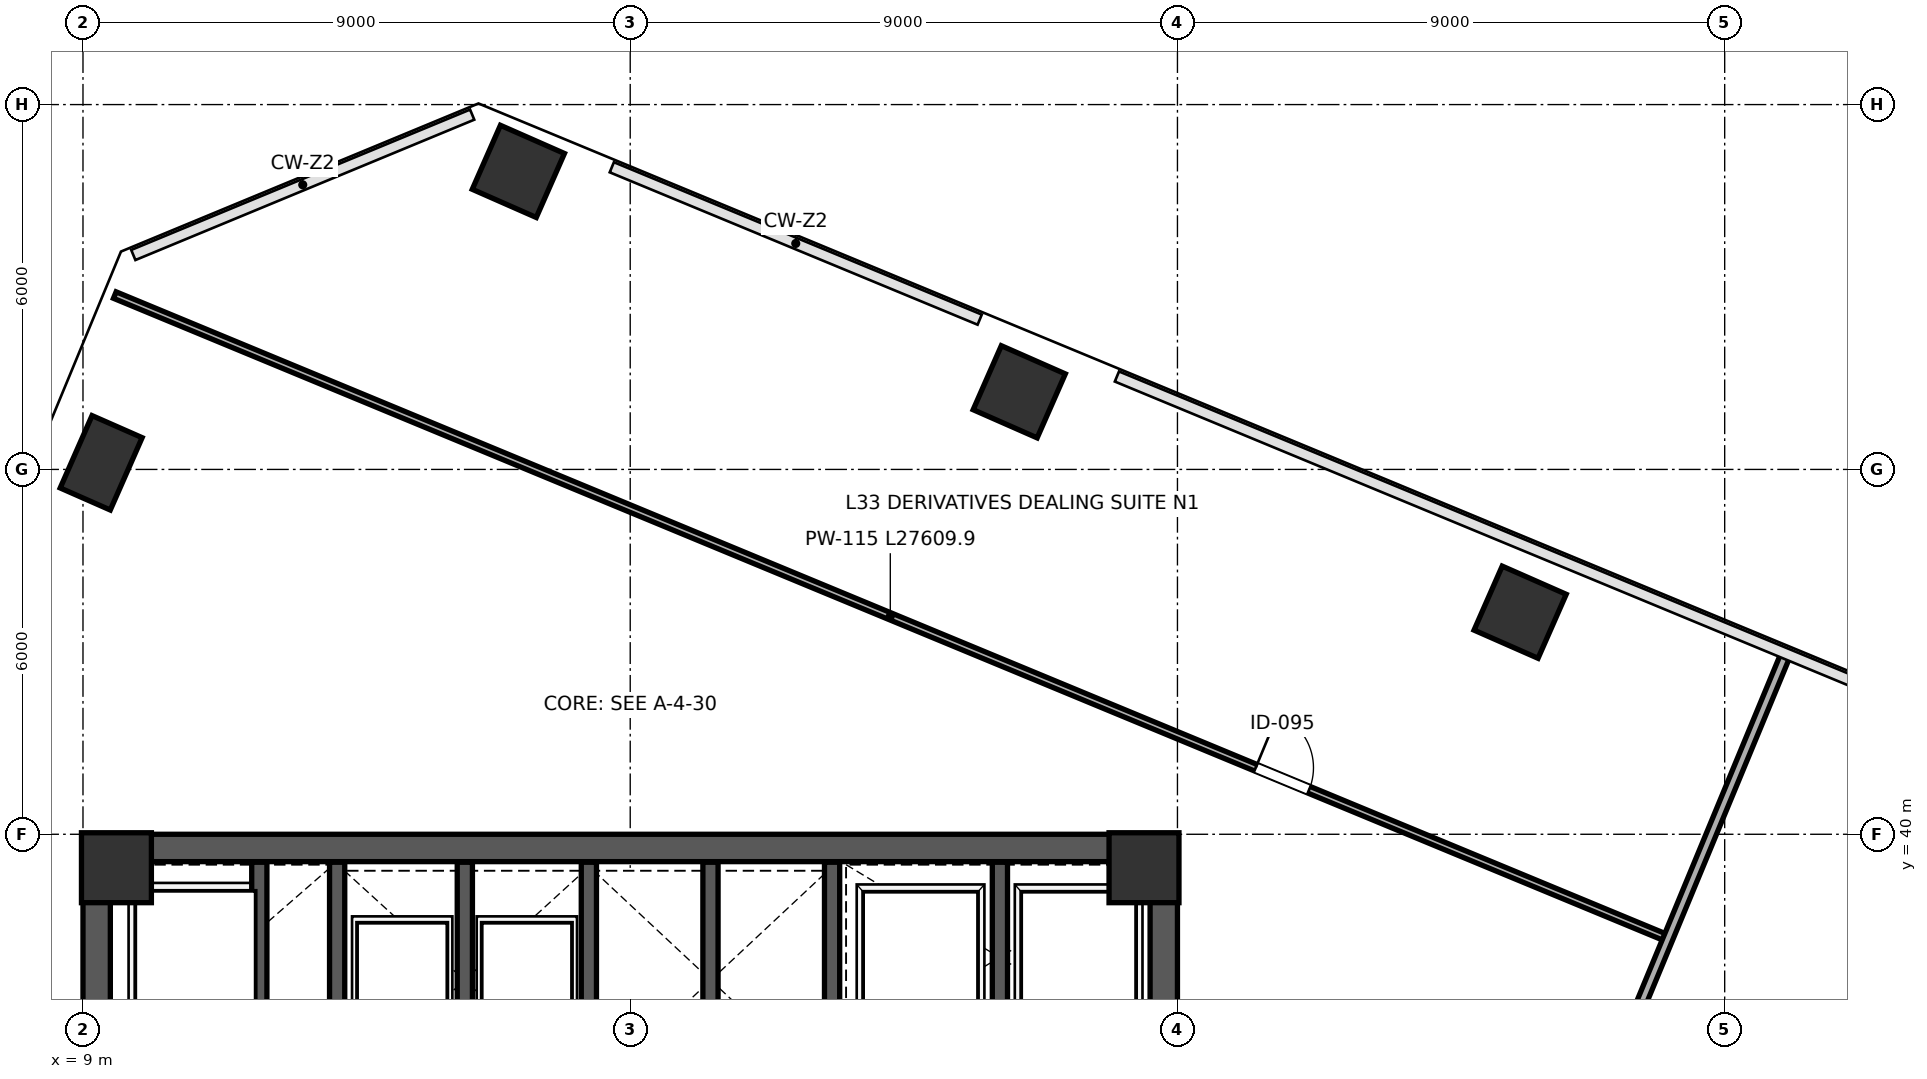
"""IFC4 building model, lengths in metres.
Left out: names, types, materials, properties, quantities, classifications, styles, units other than length and angle.
Written with IfcOpenShell. Run it as: python <this file> out.ifc"""

import sys

from ifc_helpers import new_model, si_unit, direction, frame, frame_2d, origin, origin_2d, place, context, subcontext, project, spatial, rectangle, extrude, clip, halfspace, source, transform, mapped, element, fill, save


model = new_model("IFC4")
c1 = context("Model", 3, precision=1e-05, world=origin(), true_north=direction((0.0, 1.0)))
c2 = subcontext(c1, "Body", "Model", "MODEL_VIEW")
j1 = project(units=[si_unit("LENGTHUNIT", "METRE"), si_unit("PLANEANGLEUNIT", "RADIAN")], contexts=[c1])
p1 = place(None, origin())
s1 = spatial("IfcSite", under=j1, at=p1, CompositionType="ELEMENT")
p2 = place(p1, origin())
s2 = spatial("IfcBuilding", under=s1, at=p2, CompositionType="ELEMENT")
p3 = place(p2, frame((0.0, 0.0, 149.8)))
s3 = spatial("IfcBuildingStorey", under=s2, at=p3, CompositionType="ELEMENT", Elevation=149.8)
m1 = source(origin(), c2, "Body", "SweptSolid", [
    extrude(rectangle(XDim=1.15, YDim=1.15, at=origin_2d()), origin(), (0.0, 0.0, 1.0), 4.198),
])
for number, where, z_axis, x_axis in (
    (1, (9.55, 39.45, 0.001), (0.0, 0.0, 1.0), (1.0, 0.0, 0.0)),
    (2, (26.45, 39.45, 0.001), (0.0, 0.0, 1.0), (1.0, 0.0, 0.0)),
):
    element("IfcColumn", number, at=place(p3, frame(where, z_axis=z_axis, x_axis=x_axis)), inside=s3, PredefinedType="COLUMN", context=c2, shape_type="MappedRepresentation", body=[
        mapped(m1, transform((0.0, 0.0, 0.0), scale=1.0)),
    ])
p4 = place(p3, frame((16.16, 50.901, 0.0), z_axis=(0.097962845796, 0.026485822535, 0.99483756566), x_axis=(-0.147888594985, -0.988159168403, 0.04087078876)))
e3 = element("IfcColumn", 3, at=p4, inside=s3, PredefinedType="COLUMN", context=c2, shape_type="Clipping", body=[
    clip(clip(extrude(rectangle(XDim=1.15, YDim=1.15, at=origin_2d()), origin(), (0.0, 0.0, 1.0), 4.222), halfspace(frame((0.0, 0.0, 0.078), z_axis=(0.0, 0.0, -1.0), x_axis=(1.0, 0.0, 0.0)), False)), halfspace(frame((0.0, 0.0, 4.144), z_axis=(0.0, 0.0, 1.0), x_axis=(1.0, 0.0, 0.0)), False)),
])
p5 = place(p3, frame((24.398, 47.277, 0.0), z_axis=(0.078972895195, -0.015875695732, 0.996750341916), x_axis=(-0.573957846388, -0.818241946245, 0.032442379315)))
e4 = element("IfcColumn", 4, at=p5, inside=s3, PredefinedType="COLUMN", context=c2, shape_type="Clipping", body=[
    clip(clip(extrude(rectangle(XDim=1.15, YDim=1.15, at=origin_2d()), origin(), (0.0, 0.0, 1.0), 4.214), halfspace(frame((0.0, 0.0, 0.062), z_axis=(0.0, 0.0, -1.0), x_axis=(1.0, 0.0, 0.0)), False)), halfspace(frame((0.0, 0.0, 4.152), z_axis=(0.0, 0.0, 1.0), x_axis=(1.0, 0.0, 0.0)), False)),
])
p6 = place(p3, frame((32.636, 43.652, 0.0), z_axis=(0.059722402109, -0.058274235229, 0.996512593094), x_axis=(-0.926484561929, -0.374829268194, 0.033606193079)))
e5 = element("IfcColumn", 5, at=p6, inside=s3, PredefinedType="COLUMN", context=c2, shape_type="Clipping", body=[
    clip(clip(extrude(rectangle(XDim=1.15, YDim=1.15, at=origin_2d()), origin(), (0.0, 0.0, 1.0), 4.215), halfspace(frame((0.0, 0.0, 0.064), z_axis=(0.0, 0.0, -1.0), x_axis=(1.0, 0.0, 0.0)), False)), halfspace(frame((0.0, 0.0, 4.15), z_axis=(0.0, 0.0, 1.0), x_axis=(1.0, 0.0, 0.0)), False)),
])
p7 = place(p3, frame((9.299, 46.109, 0.0), z_axis=(0.073596254147, 0.062255950835, 0.995343050391), x_axis=(0.285083814289, -0.957716020823, 0.038823218429)))
e6 = element("IfcColumn", 6, at=p7, inside=s3, PredefinedType="PILASTER", context=c2, shape_type="Clipping", body=[
    clip(clip(extrude(rectangle(XDim=0.9, YDim=1.3, at=origin_2d()), origin(), (0.0, 0.0, 1.0), 4.219), halfspace(frame((0.0, 0.0, 0.076), z_axis=(0.0, 0.0, -1.0), x_axis=(1.0, 0.0, 0.0)), False)), halfspace(frame((0.0, 0.0, 4.144), z_axis=(0.0, 0.0, 1.0), x_axis=(1.0, 0.0, 0.0)), False)),
])
p8 = place(p3, frame((9.225, 24.45, 0.0), z_axis=(0.0, 0.0, 1.0), x_axis=(0.0, 1.0, 0.0)))
e7 = element("IfcWall", 7, at=p8, inside=s3, PredefinedType="SHEAR", context=c2, shape_type="SweptSolid", body=[
    extrude(rectangle(XDim=15.1, YDim=0.45, at=frame_2d((7.55, 0.0))), origin(), (0.0, 0.0, 1.0), 3.96),
])
p9 = place(p3, frame((26.775, 24.45, 0.0), z_axis=(0.0, 0.0, 1.0), x_axis=(0.0, 1.0, 0.0)))
e8 = element("IfcWall", 8, at=p9, inside=s3, PredefinedType="SHEAR", context=c2, shape_type="SweptSolid", body=[
    extrude(rectangle(XDim=15.1, YDim=0.45, at=frame_2d((7.55, 0.0))), origin(), (0.0, 0.0, 1.0), 3.96),
])
p10 = place(p9, frame((8.6, 0.0, 0.0)))
e9 = element("IfcOpeningElement", 9, at=p10, cuts=e8, PredefinedType="OPENING", context=c2, shape_type="SweptSolid", body=[
    extrude(rectangle(XDim=1.15, YDim=2.2, at=frame_2d((0.575, 1.1))), frame((0.0, 0.235, 0.0), z_axis=(0.0, -1.0, 0.0), x_axis=(1.0, 0.0, 0.0)), (0.0, 0.0, 1.0), 0.47),
])
p11 = place(p3, frame((9.0, 39.775, 0.0), z_axis=(0.0, 0.0, 1.0), x_axis=(1.0, 0.0, 0.0)))
e10 = element("IfcWall", 10, at=p11, inside=s3, PredefinedType="SHEAR", context=c2, shape_type="SweptSolid", body=[
    extrude(rectangle(XDim=18.0, YDim=0.45, at=frame_2d((9.0, 0.0))), origin(), (0.0, 0.0, 1.0), 3.96),
])
p12 = place(p3, frame((21.32, 32.12, 0.0), z_axis=(0.0, 0.0, 1.0), x_axis=(0.0, 1.0, 0.0)))
e11 = element("IfcWall", 11, at=p12, inside=s3, PredefinedType="SHEAR", context=c2, shape_type="SweptSolid", body=[
    extrude(rectangle(XDim=7.42, YDim=0.25, at=frame_2d((3.71, 0.0))), origin(), (0.0, 0.0, 1.0), 3.96),
])
p13 = place(p12, frame((1.4, 0.0, 0.0)))
e12 = element("IfcOpeningElement", 12, at=p13, cuts=e11, PredefinedType="OPENING", context=c2, shape_type="SweptSolid", body=[
    extrude(rectangle(XDim=1.15, YDim=2.2, at=frame_2d((0.575, 1.1))), frame((0.0, 0.135, 0.0), z_axis=(0.0, -1.0, 0.0), x_axis=(1.0, 0.0, 0.0)), (0.0, 0.0, 1.0), 0.27),
])
p14 = place(p3, frame((11.9, 36.31, 0.0), z_axis=(0.0, 0.0, 1.0), x_axis=(0.0, 1.0, 0.0)))
e13 = element("IfcWall", 13, at=p14, inside=s3, PredefinedType="SHEAR", context=c2, shape_type="SweptSolid", body=[
    extrude(rectangle(XDim=3.23, YDim=0.25, at=frame_2d((1.615, 0.0))), origin(), (0.0, 0.0, 1.0), 3.96),
])
p15 = place(p3, frame((24.08, 36.48, 0.0), z_axis=(0.0, 0.0, 1.0), x_axis=(0.0, 1.0, 0.0)))
e14 = element("IfcWall", 14, at=p15, inside=s3, PredefinedType="SHEAR", context=c2, shape_type="SweptSolid", body=[
    extrude(rectangle(XDim=3.06, YDim=0.25, at=frame_2d((1.53, 0.0))), origin(), (0.0, 0.0, 1.0), 3.96),
])
for number, where, z_axis, x_axis in (
    (15, (13.18, 35.81, 0.0), (0.0, 0.0, 1.0), (0.0, 1.0, 0.0)),
    (16, (15.28, 35.81, 0.0), (0.0, 0.0, 1.0), (0.0, 1.0, 0.0)),
    (17, (17.32, 35.81, 0.0), (0.0, 0.0, 1.0), (0.0, 1.0, 0.0)),
    (18, (19.32, 35.81, 0.0), (0.0, 0.0, 1.0), (0.0, 1.0, 0.0)),
):
    element("IfcWall", number, at=place(p3, frame(where, z_axis=z_axis, x_axis=x_axis)), inside=s3, PredefinedType="SHEAR", context=c2, shape_type="SweptSolid", body=[
        extrude(rectangle(XDim=3.73, YDim=0.25, at=frame_2d((1.865, 0.0))), origin(), (0.0, 0.0, 1.0), 3.96),
    ])
p16 = place(p3, frame((9.523, 48.867, 0.0), z_axis=(0.0, 0.0, 1.0), x_axis=(0.923882225555, -0.382676930718, 0.0)))
e19 = element("IfcWall", 19, at=p16, inside=s3, PredefinedType="PARTITIONING", context=c2, shape_type="SweptSolid", body=[
    extrude(rectangle(XDim=27.61, YDim=0.115, at=frame_2d((13.805, 0.0))), origin(), (0.0, 0.0, 1.0), 3.96),
])
p17 = place(p16, frame((20.31, 0.0, 0.0)))
e20 = element("IfcOpeningElement", 20, at=p17, cuts=e19, PredefinedType="OPENING", context=c2, shape_type="SweptSolid", body=[
    extrude(rectangle(XDim=0.95, YDim=2.15, at=frame_2d((0.475, 1.075))), frame((0.0, 0.067, 0.0), z_axis=(0.0, -1.0, 0.0), x_axis=(1.0, 0.0, 0.0)), (0.0, 0.0, 1.0), 0.135),
])
p18 = place(p3, frame((30.162, 26.442, 0.0), z_axis=(0.0, 0.0, 1.0), x_axis=(0.382688600046, 0.923877391971, 0.0)))
e21 = element("IfcWall", 21, at=p18, inside=s3, PredefinedType="PARTITIONING", context=c2, shape_type="SweptSolid", body=[
    extrude(rectangle(XDim=17.84, YDim=0.16, at=frame_2d((8.92, 0.0))), origin(), (0.0, 0.0, 1.0), 3.195),
])
m2 = source(origin(), c2, "Body", "SweptSolid", [
    extrude(rectangle(XDim=0.95, YDim=2.15, at=frame_2d((0.475, 1.075))), frame((0.0, 0.025, 0.0), z_axis=(0.0, -1.0, 0.0), x_axis=(1.0, 0.0, 0.0)), (0.0, 0.0, 1.0), 0.05),
])
p19 = place(p17, origin())
e22 = element("IfcDoor", 22, at=p19, inside=s3, OperationType="SINGLE_SWING_LEFT", PredefinedType="DOOR", context=c2, shape_type="MappedRepresentation", body=[
    mapped(m2, transform((0.0, 0.0, 0.0), scale=1.0)),
])
fill(e20, e22)
save(model, sys.argv[1])
